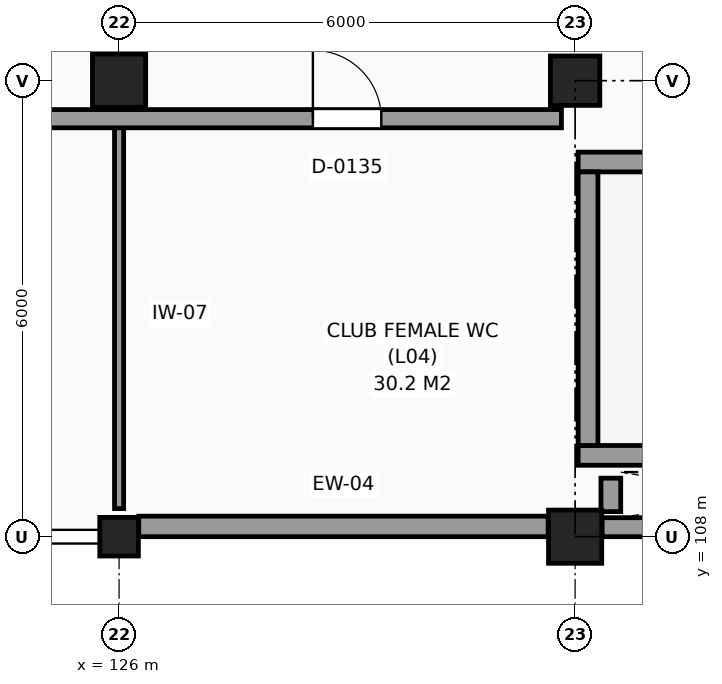
"""IFC4 building model, lengths in metres.
Left out: names, types, materials, properties, quantities, classifications, styles, units other than length and angle.
Written with IfcOpenShell. Run it as: python <this file> out.ifc"""

import sys

from ifc_helpers import new_model, si_unit, direction, frame, frame_2d, origin, origin_2d, place, context, subcontext, project, spatial, rectangle, hollow_circle, extrude, element, fill, save


model = new_model("IFC4")
c1 = context("Model", 3, precision=1e-05, world=origin(), true_north=direction((0.0, 1.0)))
c2 = subcontext(c1, "Body", "Model", "MODEL_VIEW")
j1 = project(units=[si_unit("LENGTHUNIT", "METRE"), si_unit("PLANEANGLEUNIT", "RADIAN")], contexts=[c1])
p1 = place(None, origin())
s1 = spatial("IfcSite", under=j1, at=p1, CompositionType="ELEMENT")
p2 = place(p1, origin())
s2 = spatial("IfcBuilding", under=s1, at=p2, CompositionType="ELEMENT")
p3 = place(p2, frame((0.0, 0.0, 19.8)))
s3 = spatial("IfcBuildingStorey", under=s2, at=p3, CompositionType="ELEMENT", Elevation=19.8)
p4 = place(p3, frame((126.0, 108.0, 0.0), z_axis=(0.0, 0.0, 1.0), x_axis=(1.0, 0.0, 0.0)))
e1 = element("IfcColumn", 1, at=p4, inside=s3, PredefinedType="COLUMN", context=c2, shape_type="SweptSolid", body=[
    extrude(hollow_circle(Radius=0.254, WallThickness=0.025, at=origin_2d()), origin(), (0.0, 0.0, 1.0), 4.8),
])
for number, where, z_axis, x_axis in (
    (2, (126.0, 114.0, 0.0), (0.0, 0.0, 1.0), (1.0, 0.0, 0.0)),
    (3, (132.0, 108.0, 0.0), (0.0, 0.0, 1.0), (1.0, 0.0, 0.0)),
):
    element("IfcColumn", number, at=place(p3, frame(where, z_axis=z_axis, x_axis=x_axis)), inside=s3, PredefinedType="COLUMN", context=c2, shape_type="SweptSolid", body=[
        extrude(rectangle(XDim=0.7, YDim=0.7, at=origin_2d()), origin(), (0.0, 0.0, 1.0), 4.8),
    ])
p5 = place(p3, frame((132.0, 114.0, 0.0), z_axis=(0.0, 0.0, 1.0), x_axis=(1.0, 0.0, 0.0)))
e4 = element("IfcColumn", 4, at=p5, inside=s3, PredefinedType="COLUMN", context=c2, shape_type="SweptSolid", body=[
    extrude(rectangle(XDim=0.65, YDim=0.65, at=origin_2d()), origin(), (0.0, 0.0, 1.0), 4.8),
])
p6 = place(p3, frame((126.259, 108.135, 0.0), z_axis=(0.0, 0.0, 1.0), x_axis=(1.0, 0.0, 0.0)))
e5 = element("IfcWall", 5, at=p6, inside=s3, PredefinedType="SOLIDWALL", context=c2, shape_type="SweptSolid", body=[
    extrude(rectangle(XDim=5.386, YDim=0.27, at=frame_2d((2.693, 0.0))), origin(), (0.0, 0.0, 1.0), 3.9),
])
p7 = place(p3, frame((132.355, 108.125, 0.0), z_axis=(0.0, 0.0, 1.0), x_axis=(1.0, 0.0, 0.0)))
e6 = element("IfcWall", 6, at=p7, inside=s3, PredefinedType="SOLIDWALL", context=c2, shape_type="SweptSolid", body=[
    extrude(rectangle(XDim=5.315, YDim=0.25, at=frame_2d((2.657, 0.0))), origin(), (0.0, 0.0, 1.0), 4.55),
])
for number, where, z_axis, x_axis in (
    (7, (132.04, 109.07, 0.0), (0.0, 0.0, 1.0), (1.0, 0.0, 0.0)),
    (8, (132.04, 112.93, 0.0), (0.0, 0.0, 1.0), (1.0, 0.0, 0.0)),
):
    element("IfcWall", number, at=place(p3, frame(where, z_axis=z_axis, x_axis=x_axis)), inside=s3, PredefinedType="SHEAR", context=c2, shape_type="SweptSolid", body=[
        extrude(rectangle(XDim=10.72, YDim=0.26, at=frame_2d((5.36, 0.0))), origin(), (0.0, 0.0, 1.0), 4.8),
    ])
p8 = place(p3, frame((132.17, 109.2, 0.0), z_axis=(0.0, 0.0, 1.0), x_axis=(0.0, 1.0, 0.0)))
e9 = element("IfcWall", 9, at=p8, inside=s3, PredefinedType="SHEAR", context=c2, shape_type="SweptSolid", body=[
    extrude(rectangle(XDim=3.6, YDim=0.26, at=frame_2d((1.8, 0.0))), origin(), (0.0, 0.0, 1.0), 4.8),
])
p9 = place(p3, frame((132.47, 108.33, 0.0), z_axis=(0.0, 0.0, 1.0), x_axis=(0.0, 1.0, 0.0)))
e10 = element("IfcWall", 10, at=p9, inside=s3, PredefinedType="SHEAR", context=c2, shape_type="SweptSolid", body=[
    extrude(rectangle(XDim=0.44, YDim=0.26, at=frame_2d((0.22, 0.0))), origin(), (0.0, 0.0, 1.0), 4.8),
])
p10 = place(p3, frame((126.0, 108.37, 0.0), z_axis=(0.0, 0.0, 1.0), x_axis=(0.0, 1.0, 0.0)))
e11 = element("IfcWall", 11, at=p10, inside=s3, PredefinedType="PARTITIONING", context=c2, shape_type="SweptSolid", body=[
    extrude(rectangle(XDim=5.13, YDim=0.12, at=frame_2d((2.565, 0.0))), origin(), (0.0, 0.0, 1.0), 3.75),
])
p11 = place(p3, frame((120.18, 113.5, 0.0), z_axis=(0.0, 0.0, 1.0), x_axis=(1.0, 0.0, 0.0)))
e12 = element("IfcWall", 12, at=p11, inside=s3, PredefinedType="PARTITIONING", context=c2, shape_type="SweptSolid", body=[
    extrude(rectangle(XDim=11.64, YDim=0.24, at=frame_2d((5.82, 0.0))), origin(), (0.0, 0.0, 1.0), 4.55),
])
p12 = place(p11, frame((2.37, 0.0, 0.0)))
e13 = element("IfcOpeningElement", 13, at=p12, cuts=e12, PredefinedType="OPENING", context=c2, shape_type="SweptSolid", body=[
    extrude(rectangle(XDim=0.9, YDim=2.1, at=frame_2d((0.45, 1.05))), frame((0.0, 0.13, 0.0), z_axis=(0.0, -1.0, 0.0), x_axis=(1.0, 0.0, 0.0)), (0.0, 0.0, 1.0), 0.26),
])
p13 = place(p11, frame((8.37, 0.0, 0.0)))
e14 = element("IfcOpeningElement", 14, at=p13, cuts=e12, PredefinedType="OPENING", context=c2, shape_type="SweptSolid", body=[
    extrude(rectangle(XDim=0.9, YDim=2.1, at=frame_2d((0.45, 1.05))), frame((0.0, 0.13, 0.0), z_axis=(0.0, -1.0, 0.0), x_axis=(1.0, 0.0, 0.0)), (0.0, 0.0, 1.0), 0.26),
])
p14 = place(p13, origin())
e15 = element("IfcDoor", 15, at=p14, inside=s3, OperationType="SINGLE_SWING_LEFT", PredefinedType="DOOR", context=c2, shape_type="SweptSolid", body=[
    extrude(rectangle(XDim=0.9, YDim=2.1, at=frame_2d((0.45, 1.05))), frame((0.0, 0.025, 0.0), z_axis=(0.0, -1.0, 0.0), x_axis=(1.0, 0.0, 0.0)), (0.0, 0.0, 1.0), 0.05),
])
fill(e14, e15)
save(model, sys.argv[1])
